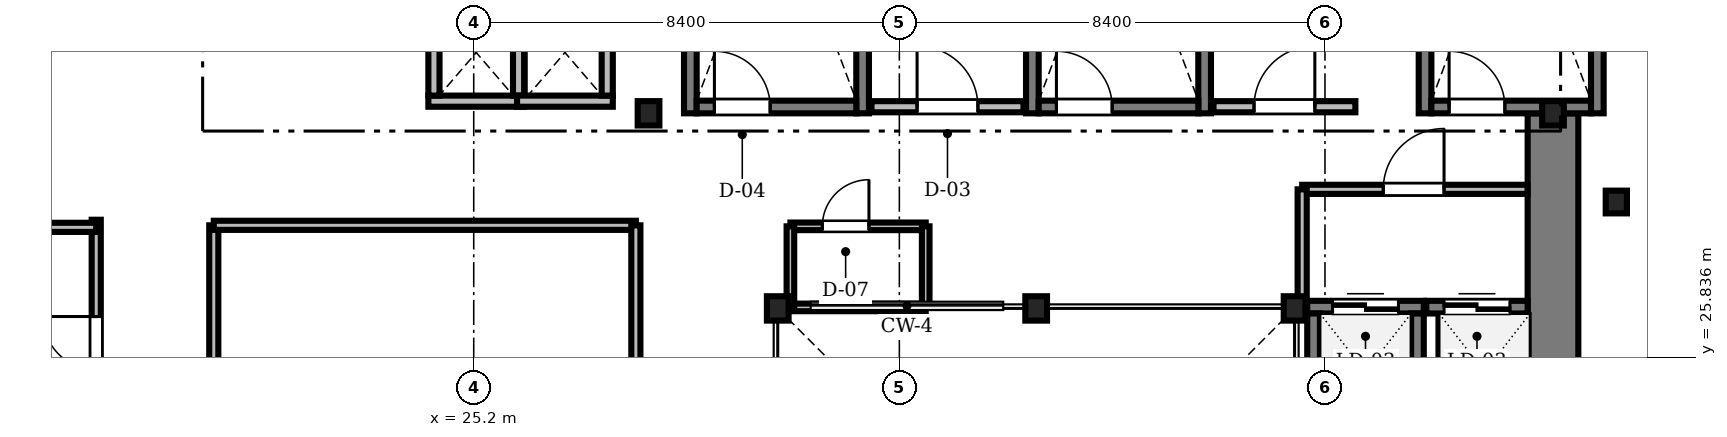
"""IFC4 building model, lengths in metres.
Left out: names, types, materials, properties, quantities, classifications, styles, units other than length and angle.
Written with IfcOpenShell. Run it as: python <this file> out.ifc"""

import sys

from ifc_helpers import new_model, si_unit, direction, frame, frame_2d, origin, origin_2d, place, context, subcontext, project, spatial, rectangle, i_section, extrude, source, transform, mapped, element, fill, save


model = new_model("IFC4")
c1 = context("Model", 3, precision=1e-05, world=origin(), true_north=direction((0.0, 1.0)))
c2 = subcontext(c1, "Body", "Model", "MODEL_VIEW")
j1 = project(units=[si_unit("LENGTHUNIT", "METRE"), si_unit("PLANEANGLEUNIT", "RADIAN")], contexts=[c1])
p1 = place(None, origin())
s1 = spatial("IfcSite", under=j1, at=p1, CompositionType="ELEMENT")
p2 = place(p1, origin())
s2 = spatial("IfcBuilding", under=s1, at=p2, CompositionType="ELEMENT")
p3 = place(p2, frame((0.0, 0.0, 31.25)))
s3 = spatial("IfcBuildingStorey", under=s2, at=p3, CompositionType="ELEMENT", Elevation=31.25)
m1 = source(origin(), c2, "Body", "SweptSolid", [
    extrude(rectangle(XDim=13.15, YDim=1.0, at=frame_2d((6.575, 0.0))), origin(), (0.0, 0.0, 1.0), 3.41),
])
p4 = place(p3, frame((46.5, 17.5, 0.0), z_axis=(0.0, 0.0, 1.0), x_axis=(0.0, 1.0, 0.0)))
e1 = element("IfcWall", 1, at=p4, inside=s3, PredefinedType="SHEAR", context=c2, shape_type="MappedRepresentation", body=[
    mapped(m1, transform((0.0, 0.0, 0.0), scale=1.0)),
])
m2 = source(origin(), c2, "Body", "SweptSolid", [
    extrude(i_section(OverallWidth=0.428, OverallDepth=0.481, WebThickness=0.04, FlangeThickness=0.063, FilletRadius=0.015, at=origin_2d()), origin(), (0.0, 0.0, 1.0), 3.41),
])
for number, where, z_axis, x_axis in (
    (2, (41.4, 26.8, 0.0), (0.0, 0.0, 1.0), (1.0, 0.0, 0.0)),
    (3, (36.3, 26.8, 0.0), (0.0, 0.0, 1.0), (1.0, 0.0, 0.0)),
    (4, (31.2, 26.8, 0.0), (0.0, 0.0, 1.0), (1.0, 0.0, 0.0)),
    (5, (28.65, 30.65, 0.0), (0.0, 0.0, 1.0), (1.0, 0.0, 0.0)),
    (6, (46.5, 30.65, 0.0), (0.0, 0.0, 1.0), (1.0, 0.0, 0.0)),
):
    element("IfcColumn", number, at=place(p3, frame(where, z_axis=z_axis, x_axis=x_axis)), inside=s3, PredefinedType="COLUMN", context=c2, shape_type="MappedRepresentation", body=[
        mapped(m2, transform((0.0, 0.0, 0.0), scale=1.0)),
    ])
m3 = source(origin(), c2, "Body", "SweptSolid", [
    extrude(i_section(OverallWidth=0.419, OverallDepth=0.449, WebThickness=0.031, FlangeThickness=0.048, FilletRadius=0.015, at=origin_2d()), origin(), (0.0, 0.0, 1.0), 3.41),
])
p5 = place(p3, frame((47.75, 28.9, 0.0), z_axis=(0.0, 0.0, 1.0), x_axis=(1.0, 0.0, 0.0)))
e7 = element("IfcColumn", 7, at=p5, inside=s3, PredefinedType="COLUMN", context=c2, shape_type="MappedRepresentation", body=[
    mapped(m3, transform((0.0, 0.0, 0.0), scale=1.0)),
])
m4 = source(origin(), c2, "Body", "SweptSolid", [
    extrude(rectangle(XDim=9.15, YDim=0.25, at=frame_2d((4.575, 0.0))), origin(), (0.0, 0.0, 1.0), 3.45),
])
for number, where, z_axis, x_axis in (
    (8, (29.475, 30.65, 0.0), (0.0, 0.0, 1.0), (0.0, 1.0, 0.0)),
    (9, (32.875, 30.65, 0.0), (0.0, 0.0, 1.0), (0.0, 1.0, 0.0)),
):
    element("IfcWall", number, at=place(p3, frame(where, z_axis=z_axis, x_axis=x_axis)), inside=s3, PredefinedType="SOLIDWALL", context=c2, shape_type="MappedRepresentation", body=[
        mapped(m4, transform((0.0, 0.0, 0.0), scale=1.0)),
    ])
m5 = source(origin(), c2, "Body", "SweptSolid", [
    extrude(rectangle(XDim=3.15, YDim=0.25, at=frame_2d((1.575, 0.0))), origin(), (0.0, 0.0, 1.0), 3.45),
])
p6 = place(p3, frame((29.6, 30.775, 0.0), z_axis=(0.0, 0.0, 1.0), x_axis=(1.0, 0.0, 0.0)))
e10 = element("IfcWall", 10, at=p6, inside=s3, PredefinedType="SOLIDWALL", context=c2, shape_type="MappedRepresentation", body=[
    mapped(m5, transform((0.0, 0.0, 0.0), scale=1.0)),
])
m6 = source(origin(), c2, "Body", "SweptSolid", [
    extrude(rectangle(XDim=1.1, YDim=2.2, at=frame_2d((0.55, 1.1))), frame((0.0, 0.135, 0.0), z_axis=(0.0, -1.0, 0.0), x_axis=(1.0, 0.0, 0.0)), (0.0, 0.0, 1.0), 0.27),
])
p7 = place(p6, frame((0.35, 0.0, 0.0)))
e11 = element("IfcOpeningElement", 11, at=p7, cuts=e10, PredefinedType="OPENING", context=c2, shape_type="MappedRepresentation", body=[
    mapped(m6, transform((0.0, 0.0, 0.0), scale=1.0)),
])
for number, where, z_axis, x_axis in (
    (12, (36.225, 30.65, 0.0), (0.0, 0.0, 1.0), (0.0, 1.0, 0.0)),
    (13, (39.625, 30.65, 0.0), (0.0, 0.0, 1.0), (0.0, 1.0, 0.0)),
):
    element("IfcWall", number, at=place(p3, frame(where, z_axis=z_axis, x_axis=x_axis)), inside=s3, PredefinedType="SOLIDWALL", context=c2, shape_type="MappedRepresentation", body=[
        mapped(m4, transform((0.0, 0.0, 0.0), scale=1.0)),
    ])
p8 = place(p3, frame((36.35, 30.775, 0.0), z_axis=(0.0, 0.0, 1.0), x_axis=(1.0, 0.0, 0.0)))
e14 = element("IfcWall", 14, at=p8, inside=s3, PredefinedType="SOLIDWALL", context=c2, shape_type="MappedRepresentation", body=[
    mapped(m5, transform((0.0, 0.0, 0.0), scale=1.0)),
])
p9 = place(p8, frame((0.35, 0.0, 0.0)))
e15 = element("IfcOpeningElement", 15, at=p9, cuts=e14, PredefinedType="OPENING", context=c2, shape_type="MappedRepresentation", body=[
    mapped(m6, transform((0.0, 0.0, 0.0), scale=1.0)),
])
for number, where, z_axis, x_axis in (
    (16, (43.975, 30.65, 0.0), (0.0, 0.0, 1.0), (0.0, 1.0, 0.0)),
    (17, (47.375, 30.65, 0.0), (0.0, 0.0, 1.0), (0.0, 1.0, 0.0)),
):
    element("IfcWall", number, at=place(p3, frame(where, z_axis=z_axis, x_axis=x_axis)), inside=s3, PredefinedType="SOLIDWALL", context=c2, shape_type="MappedRepresentation", body=[
        mapped(m4, transform((0.0, 0.0, 0.0), scale=1.0)),
    ])
p10 = place(p3, frame((44.1, 30.775, 0.0), z_axis=(0.0, 0.0, 1.0), x_axis=(1.0, 0.0, 0.0)))
e18 = element("IfcWall", 18, at=p10, inside=s3, PredefinedType="SOLIDWALL", context=c2, shape_type="MappedRepresentation", body=[
    mapped(m5, transform((0.0, 0.0, 0.0), scale=1.0)),
])
p11 = place(p10, frame((0.35, 0.0, 0.0)))
e19 = element("IfcOpeningElement", 19, at=p11, cuts=e18, PredefinedType="OPENING", context=c2, shape_type="MappedRepresentation", body=[
    mapped(m6, transform((0.0, 0.0, 0.0), scale=1.0)),
])
m7 = source(origin(), c2, "Body", "SweptSolid", [
    extrude(rectangle(XDim=3.0, YDim=0.22, at=frame_2d((1.5, 0.0))), origin(), (0.0, 0.0, 1.0), 3.41),
])
p12 = place(p3, frame((33.05, 30.78, 0.0), z_axis=(0.0, 0.0, 1.0), x_axis=(1.0, 0.0, 0.0)))
e20 = element("IfcWall", 20, at=p12, inside=s3, PredefinedType="SOLIDWALL", context=c2, shape_type="MappedRepresentation", body=[
    mapped(m7, transform((0.0, 0.0, 0.0), scale=1.0)),
])
m8 = source(origin(), c2, "Body", "SweptSolid", [
    extrude(rectangle(XDim=1.2, YDim=2.2, at=frame_2d((0.6, 1.1))), frame((0.0, 0.12, 0.0), z_axis=(0.0, -1.0, 0.0), x_axis=(1.0, 0.0, 0.0)), (0.0, 0.0, 1.0), 0.24),
])
p13 = place(p12, frame((0.9, 0.0, 0.0)))
e21 = element("IfcOpeningElement", 21, at=p13, cuts=e20, PredefinedType="OPENING", context=c2, shape_type="MappedRepresentation", body=[
    mapped(m8, transform((0.0, 0.0, 0.0), scale=1.0)),
])
m9 = source(origin(), c2, "Body", "SweptSolid", [
    extrude(rectangle(XDim=2.8, YDim=0.22, at=frame_2d((1.4, 0.0))), origin(), (0.0, 0.0, 1.0), 3.41),
])
p14 = place(p3, frame((39.8, 30.78, 0.0), z_axis=(0.0, 0.0, 1.0), x_axis=(1.0, 0.0, 0.0)))
e22 = element("IfcWall", 22, at=p14, inside=s3, PredefinedType="SOLIDWALL", context=c2, shape_type="MappedRepresentation", body=[
    mapped(m9, transform((0.0, 0.0, 0.0), scale=1.0)),
])
p15 = place(p14, frame((0.8, 0.0, 0.0)))
e23 = element("IfcOpeningElement", 23, at=p15, cuts=e22, PredefinedType="OPENING", context=c2, shape_type="MappedRepresentation", body=[
    mapped(m8, transform((0.0, 0.0, 0.0), scale=1.0)),
])
m10 = source(origin(), c2, "Body", "SweptSolid", [
    extrude(rectangle(XDim=1.89, YDim=0.22, at=frame_2d((0.945, 0.0))), origin(), (0.0, 0.0, 1.0), 3.41),
])
p16 = place(p3, frame((24.305, 30.89, 0.0), z_axis=(0.0, 0.0, 1.0), x_axis=(1.0, 0.0, 0.0)))
e24 = element("IfcWall", 24, at=p16, inside=s3, PredefinedType="SOLIDWALL", context=c2, shape_type="MappedRepresentation", body=[
    mapped(m10, transform((0.0, 0.0, 0.0), scale=1.0)),
])
m11 = source(origin(), c2, "Body", "SweptSolid", [
    extrude(rectangle(XDim=1.7, YDim=0.22, at=frame_2d((0.85, 0.0))), origin(), (0.0, 0.0, 1.0), 3.41),
])
for number, where, z_axis, x_axis in (
    (25, (24.415, 31.0, 0.0), (0.0, 0.0, 1.0), (0.0, 1.0, 0.0)),
    (26, (26.085, 31.0, 0.0), (0.0, 0.0, 1.0), (0.0, 1.0, 0.0)),
):
    element("IfcWall", number, at=place(p3, frame(where, z_axis=z_axis, x_axis=x_axis)), inside=s3, PredefinedType="SOLIDWALL", context=c2, shape_type="MappedRepresentation", body=[
        mapped(m11, transform((0.0, 0.0, 0.0), scale=1.0)),
    ])
p17 = place(p3, frame((26.055, 30.89, 0.0), z_axis=(0.0, 0.0, 1.0), x_axis=(1.0, 0.0, 0.0)))
e27 = element("IfcWall", 27, at=p17, inside=s3, PredefinedType="SOLIDWALL", context=c2, shape_type="MappedRepresentation", body=[
    mapped(m10, transform((0.0, 0.0, 0.0), scale=1.0)),
])
p18 = place(p3, frame((27.835, 31.0, 0.0), z_axis=(0.0, 0.0, 1.0), x_axis=(0.0, 1.0, 0.0)))
e28 = element("IfcWall", 28, at=p18, inside=s3, PredefinedType="SOLIDWALL", context=c2, shape_type="MappedRepresentation", body=[
    mapped(m11, transform((0.0, 0.0, 0.0), scale=1.0)),
])
m12 = source(origin(), c2, "Body", "SweptSolid", [
    extrude(rectangle(XDim=2.3, YDim=0.25, at=frame_2d((1.15, 0.0))), origin(), (0.0, 0.0, 1.0), 3.41),
])
p19 = place(p3, frame((41.65, 26.825, 0.0), z_axis=(0.0, 0.0, 1.0), x_axis=(1.0, 0.0, 0.0)))
e29 = element("IfcWall", 29, at=p19, inside=s3, PredefinedType="SOLIDWALL", context=c2, shape_type="MappedRepresentation", body=[
    mapped(m12, transform((0.0, 0.0, 0.0), scale=1.0)),
])
m13 = source(origin(), c2, "Body", "SweptSolid", [
    extrude(rectangle(XDim=1.3, YDim=2.3, at=frame_2d((0.65, 1.15))), frame((0.0, 0.135, 0.0), z_axis=(0.0, -1.0, 0.0), x_axis=(1.0, 0.0, 0.0)), (0.0, 0.0, 1.0), 0.27),
])
p20 = place(p19, frame((0.5, 0.0, 0.0)))
e30 = element("IfcOpeningElement", 30, at=p20, cuts=e29, PredefinedType="OPENING", context=c2, shape_type="MappedRepresentation", body=[
    mapped(m13, transform((0.0, 0.0, 0.0), scale=1.0)),
])
for number, where, z_axis, x_axis in (
    (31, (41.775, 24.4, 0.0), (0.0, 0.0, 1.0), (0.0, 1.0, 0.0)),
    (32, (43.825, 24.4, 0.0), (0.0, 0.0, 1.0), (0.0, 1.0, 0.0)),
):
    element("IfcWall", number, at=place(p3, frame(where, z_axis=z_axis, x_axis=x_axis)), inside=s3, PredefinedType="SOLIDWALL", context=c2, shape_type="MappedRepresentation", body=[
        mapped(m12, transform((0.0, 0.0, 0.0), scale=1.0)),
    ])
m14 = source(origin(), c2, "Body", "SweptSolid", [
    extrude(rectangle(XDim=2.0, YDim=0.25, at=frame_2d((1.0, 0.0))), origin(), (0.0, 0.0, 1.0), 3.41),
])
p21 = place(p3, frame((44.0, 26.825, 0.0), z_axis=(0.0, 0.0, 1.0), x_axis=(1.0, 0.0, 0.0)))
e33 = element("IfcWall", 33, at=p21, inside=s3, PredefinedType="SOLIDWALL", context=c2, shape_type="MappedRepresentation", body=[
    mapped(m14, transform((0.0, 0.0, 0.0), scale=1.0)),
])
p22 = place(p21, frame((0.35, 0.0, 0.0)))
e34 = element("IfcOpeningElement", 34, at=p22, cuts=e33, PredefinedType="OPENING", context=c2, shape_type="MappedRepresentation", body=[
    mapped(m13, transform((0.0, 0.0, 0.0), scale=1.0)),
])
m15 = source(origin(), c2, "Body", "SweptSolid", [
    extrude(rectangle(XDim=13.89, YDim=0.18, at=frame_2d((6.945, 0.0))), origin(), (0.0, 0.0, 1.0), 2.802),
])
p23 = place(p3, frame((17.75, 14.66, 0.0), z_axis=(0.0, 0.0, 1.0), x_axis=(0.0, 1.0, 0.0)))
e35 = element("IfcWall", 35, at=p23, inside=s3, PredefinedType="PARTITIONING", context=c2, shape_type="MappedRepresentation", body=[
    mapped(m15, transform((0.0, 0.0, 0.0), scale=1.0)),
])
m16 = source(origin(), c2, "Body", "SweptSolid", [
    extrude(rectangle(XDim=1.05, YDim=2.2, at=frame_2d((0.525, 1.1))), frame((0.0, 0.1, 0.0), z_axis=(0.0, -1.0, 0.0), x_axis=(1.0, 0.0, 0.0)), (0.0, 0.0, 1.0), 0.2),
])
p24 = place(p23, frame((1.77, 0.0, 0.0)))
e36 = element("IfcOpeningElement", 36, at=p24, cuts=e35, PredefinedType="OPENING", context=c2, shape_type="MappedRepresentation", body=[
    mapped(m16, transform((0.0, 0.0, 0.0), scale=1.0)),
])
m17 = source(origin(), c2, "Body", "SweptSolid", [
    extrude(rectangle(XDim=0.95, YDim=2.15, at=frame_2d((0.475, 1.075))), frame((0.0, 0.1, 0.0), z_axis=(0.0, -1.0, 0.0), x_axis=(1.0, 0.0, 0.0)), (0.0, 0.0, 1.0), 0.2),
])
p25 = place(p23, frame((7.575, 0.0, 0.0)))
e37 = element("IfcOpeningElement", 37, at=p25, cuts=e35, PredefinedType="OPENING", context=c2, shape_type="MappedRepresentation", body=[
    mapped(m17, transform((0.0, 0.0, 0.0), scale=1.0)),
])
p26 = place(p23, frame((10.93, 0.0, 0.0)))
e38 = element("IfcOpeningElement", 38, at=p26, cuts=e35, PredefinedType="OPENING", context=c2, shape_type="MappedRepresentation", body=[
    mapped(m16, transform((0.0, 0.0, 0.0), scale=1.0)),
])
m18 = source(origin(), c2, "Body", "SweptSolid", [
    extrude(rectangle(XDim=6.54, YDim=0.18, at=frame_2d((3.27, 0.0))), origin(), (0.0, 0.0, 1.0), 2.802),
])
p27 = place(p3, frame((20.07, 21.9, 0.0), z_axis=(0.0, 0.0, 1.0), x_axis=(0.0, 1.0, 0.0)))
e39 = element("IfcWall", 39, at=p27, inside=s3, PredefinedType="PARTITIONING", context=c2, shape_type="MappedRepresentation", body=[
    mapped(m18, transform((0.0, 0.0, 0.0), scale=1.0)),
])
p28 = place(p27, frame((2.2, 0.0, 0.0)))
e40 = element("IfcOpeningElement", 40, at=p28, cuts=e39, PredefinedType="OPENING", context=c2, shape_type="MappedRepresentation", body=[
    mapped(m16, transform((0.0, 0.0, 0.0), scale=1.0)),
])
m19 = source(origin(), c2, "Body", "SweptSolid", [
    extrude(rectangle(XDim=4.448, YDim=0.18, at=frame_2d((2.224, 0.0))), origin(), (0.0, 0.0, 1.0), 3.042),
])
p29 = place(p3, frame((41.55, 29.15, 0.0), z_axis=(0.0, 0.0, 1.0), x_axis=(1.0, 0.0, 0.0)))
e41 = element("IfcWall", 41, at=p29, inside=s3, PredefinedType="PARTITIONING", context=c2, shape_type="MappedRepresentation", body=[
    mapped(m19, transform((0.0, 0.0, 0.0), scale=1.0)),
])
m20 = source(origin(), c2, "Body", "SweptSolid", [
    extrude(rectangle(XDim=1.2, YDim=2.2, at=frame_2d((0.6, 1.1))), frame((0.0, 0.1, 0.0), z_axis=(0.0, -1.0, 0.0), x_axis=(1.0, 0.0, 0.0)), (0.0, 0.0, 1.0), 0.2),
])
p30 = place(p29, frame((1.6, 0.0, 0.0)))
e42 = element("IfcOpeningElement", 42, at=p30, cuts=e41, PredefinedType="OPENING", context=c2, shape_type="MappedRepresentation", body=[
    mapped(m20, transform((0.0, 0.0, 0.0), scale=1.0)),
])
m21 = source(origin(), c2, "Body", "SweptSolid", [
    extrude(rectangle(XDim=2.67, YDim=0.15, at=frame_2d((1.335, 0.0))), origin(), (0.0, 0.0, 1.0), 3.042),
])
p31 = place(p3, frame((31.45, 28.42, 0.0), z_axis=(0.0, 0.0, 1.0), x_axis=(1.0, 0.0, 0.0)))
e43 = element("IfcWall", 43, at=p31, inside=s3, PredefinedType="PARTITIONING", context=c2, shape_type="MappedRepresentation", body=[
    mapped(m21, transform((0.0, 0.0, 0.0), scale=1.0)),
])
m22 = source(origin(), c2, "Body", "SweptSolid", [
    extrude(rectangle(XDim=0.92, YDim=2.1, at=frame_2d((0.46, 1.05))), frame((0.0, 0.085, 0.0), z_axis=(0.0, -1.0, 0.0), x_axis=(1.0, 0.0, 0.0)), (0.0, 0.0, 1.0), 0.17),
])
p32 = place(p31, frame((0.63, 0.0, 0.0)))
e44 = element("IfcOpeningElement", 44, at=p32, cuts=e43, PredefinedType="OPENING", context=c2, shape_type="MappedRepresentation", body=[
    mapped(m22, transform((0.0, 0.0, 0.0), scale=1.0)),
])
m23 = source(origin(), c2, "Body", "SweptSolid", [
    extrude(rectangle(XDim=15.52, YDim=0.18, at=frame_2d((7.76, 0.0))), origin(), (0.0, 0.0, 1.0), 2.652),
])
p33 = place(p3, frame((2.23, 28.4, 0.0), z_axis=(0.0, 0.0, 1.0), x_axis=(1.0, 0.0, 0.0)))
e45 = element("IfcWall", 45, at=p33, inside=s3, PredefinedType="PARTITIONING", context=c2, shape_type="MappedRepresentation", body=[
    mapped(m23, transform((0.0, 0.0, 0.0), scale=1.0)),
])
m24 = source(origin(), c2, "Body", "SweptSolid", [
    extrude(rectangle(XDim=8.33, YDim=0.18, at=frame_2d((4.165, 0.0))), origin(), (0.0, 0.0, 1.0), 3.41),
])
p34 = place(p3, frame((20.07, 28.44, 0.0), z_axis=(0.0, 0.0, 1.0), x_axis=(1.0, 0.0, 0.0)))
e46 = element("IfcWall", 46, at=p34, inside=s3, PredefinedType="PARTITIONING", context=c2, shape_type="MappedRepresentation", body=[
    mapped(m24, transform((0.0, 0.0, 0.0), scale=1.0)),
])
p35 = place(p3, frame((28.4, 21.9, 0.0), z_axis=(0.0, 0.0, 1.0), x_axis=(0.0, 1.0, 0.0)))
e47 = element("IfcWall", 47, at=p35, inside=s3, PredefinedType="PARTITIONING", context=c2, shape_type="MappedRepresentation", body=[
    mapped(m18, transform((0.0, 0.0, 0.0), scale=1.0)),
])
m25 = source(origin(), c2, "Body", "SweptSolid", [
    extrude(rectangle(XDim=2.67, YDim=0.15, at=frame_2d((1.335, 0.0))), origin(), (0.0, 0.0, 1.0), 2.952),
])
p36 = place(p3, frame((31.45, 26.82, 0.0), z_axis=(0.0, 0.0, 1.0), x_axis=(1.0, 0.0, 0.0)))
e48 = element("IfcWall", 48, at=p36, inside=s3, PredefinedType="PARTITIONING", context=c2, shape_type="MappedRepresentation", body=[
    mapped(m25, transform((0.0, 0.0, 0.0), scale=1.0)),
])
m26 = source(origin(), c2, "Body", "SweptSolid", [
    extrude(rectangle(XDim=2.35, YDim=0.18, at=frame_2d((1.175, 0.0))), origin(), (0.0, 0.0, 1.0), 2.802),
])
p37 = place(p3, frame((41.55, 26.8, 0.0), z_axis=(0.0, 0.0, 1.0), x_axis=(0.0, 1.0, 0.0)))
e49 = element("IfcWall", 49, at=p37, inside=s3, PredefinedType="PARTITIONING", context=c2, shape_type="MappedRepresentation", body=[
    mapped(m26, transform((0.0, 0.0, 0.0), scale=1.0)),
])
m27 = source(origin(), c2, "Body", "SweptSolid", [
    extrude(rectangle(XDim=1.6, YDim=0.15, at=frame_2d((0.8, 0.0))), origin(), (0.0, 0.0, 1.0), 2.952),
])
for number, where, z_axis, x_axis in (
    (50, (31.45, 26.82, 0.0), (0.0, 0.0, 1.0), (0.0, 1.0, 0.0)),
    (51, (34.12, 26.82, 0.0), (0.0, 0.0, 1.0), (0.0, 1.0, 0.0)),
):
    element("IfcWall", number, at=place(p3, frame(where, z_axis=z_axis, x_axis=x_axis)), inside=s3, PredefinedType="PARTITIONING", context=c2, shape_type="MappedRepresentation", body=[
        mapped(m27, transform((0.0, 0.0, 0.0), scale=1.0)),
    ])
m28 = source(origin(), c2, "Body", "SweptSolid", [
    extrude(rectangle(XDim=1.1, YDim=2.2, at=frame_2d((0.55, 1.1))), frame((0.0, 0.025, 0.0), z_axis=(0.0, -1.0, 0.0), x_axis=(1.0, 0.0, 0.0)), (0.0, 0.0, 1.0), 0.05),
])
p38 = place(p7, origin())
e52 = element("IfcDoor", 52, at=p38, inside=s3, OperationType="SINGLE_SWING_LEFT", PredefinedType="DOOR", context=c2, shape_type="MappedRepresentation", body=[
    mapped(m28, transform((0.0, 0.0, 0.0), scale=1.0)),
])
fill(e11, e52)
p39 = place(p9, origin())
e53 = element("IfcDoor", 53, at=p39, inside=s3, OperationType="SINGLE_SWING_LEFT", PredefinedType="DOOR", context=c2, shape_type="MappedRepresentation", body=[
    mapped(m28, transform((0.0, 0.0, 0.0), scale=1.0)),
])
fill(e15, e53)
p40 = place(p11, origin())
e54 = element("IfcDoor", 54, at=p40, inside=s3, OperationType="SINGLE_SWING_LEFT", PredefinedType="DOOR", context=c2, shape_type="MappedRepresentation", body=[
    mapped(m28, transform((0.0, 0.0, 0.0), scale=1.0)),
])
fill(e19, e54)
m29 = source(origin(), c2, "Body", "SweptSolid", [
    extrude(rectangle(XDim=1.2, YDim=2.2, at=frame_2d((0.6, 1.1))), frame((0.0, 0.025, 0.0), z_axis=(0.0, -1.0, 0.0), x_axis=(1.0, 0.0, 0.0)), (0.0, 0.0, 1.0), 0.05),
])
p41 = place(p13, origin())
e55 = element("IfcDoor", 55, at=p41, inside=s3, OperationType="SINGLE_SWING_LEFT", PredefinedType="DOOR", context=c2, shape_type="MappedRepresentation", body=[
    mapped(m29, transform((0.0, 0.0, 0.0), scale=1.0)),
])
fill(e21, e55)
p42 = place(p15, origin())
e56 = element("IfcDoor", 56, at=p42, inside=s3, OperationType="SINGLE_SWING_RIGHT", PredefinedType="DOOR", context=c2, shape_type="MappedRepresentation", body=[
    mapped(m29, transform((0.0, 0.0, 0.0), scale=1.0)),
])
fill(e23, e56)
m30 = source(origin(), c2, "Body", "SweptSolid", [
    extrude(rectangle(XDim=1.3, YDim=2.3, at=frame_2d((0.65, 1.15))), frame((0.0, 0.025, 0.0), z_axis=(0.0, -1.0, 0.0), x_axis=(1.0, 0.0, 0.0)), (0.0, 0.0, 1.0), 0.05),
])
p43 = place(p20, origin())
e57 = element("IfcDoor", 57, at=p43, inside=s3, OperationType="DOUBLE_DOOR_SLIDING", PredefinedType="DOOR", context=c2, shape_type="MappedRepresentation", body=[
    mapped(m30, transform((0.0, 0.0, 0.0), scale=1.0)),
])
fill(e30, e57)
p44 = place(p22, origin())
e58 = element("IfcDoor", 58, at=p44, inside=s3, OperationType="DOUBLE_DOOR_SLIDING", PredefinedType="DOOR", context=c2, shape_type="MappedRepresentation", body=[
    mapped(m30, transform((0.0, 0.0, 0.0), scale=1.0)),
])
fill(e34, e58)
m31 = source(origin(), c2, "Body", "SweptSolid", [
    extrude(rectangle(XDim=1.05, YDim=2.2, at=frame_2d((0.525, 1.1))), frame((0.0, 0.025, 0.0), z_axis=(0.0, -1.0, 0.0), x_axis=(1.0, 0.0, 0.0)), (0.0, 0.0, 1.0), 0.05),
])
p45 = place(p26, origin())
e59 = element("IfcDoor", 59, at=p45, inside=s3, OperationType="SINGLE_SWING_RIGHT", PredefinedType="DOOR", context=c2, shape_type="MappedRepresentation", body=[
    mapped(m31, transform((0.0, 0.0, 0.0), scale=1.0)),
])
fill(e38, e59)
p46 = place(p30, origin())
e60 = element("IfcDoor", 60, at=p46, inside=s3, OperationType="SINGLE_SWING_RIGHT", PredefinedType="DOOR", context=c2, shape_type="MappedRepresentation", body=[
    mapped(m29, transform((0.0, 0.0, 0.0), scale=1.0)),
])
fill(e42, e60)
m32 = source(origin(), c2, "Body", "SweptSolid", [
    extrude(rectangle(XDim=0.92, YDim=2.1, at=frame_2d((0.46, 1.05))), frame((0.0, 0.025, 0.0), z_axis=(0.0, -1.0, 0.0), x_axis=(1.0, 0.0, 0.0)), (0.0, 0.0, 1.0), 0.05),
])
p47 = place(p32, origin())
e61 = element("IfcDoor", 61, at=p47, inside=s3, OperationType="SINGLE_SWING_RIGHT", PredefinedType="DOOR", context=c2, shape_type="MappedRepresentation", body=[
    mapped(m32, transform((0.0, 0.0, 0.0), scale=1.0)),
])
fill(e44, e61)
save(model, sys.argv[1])
